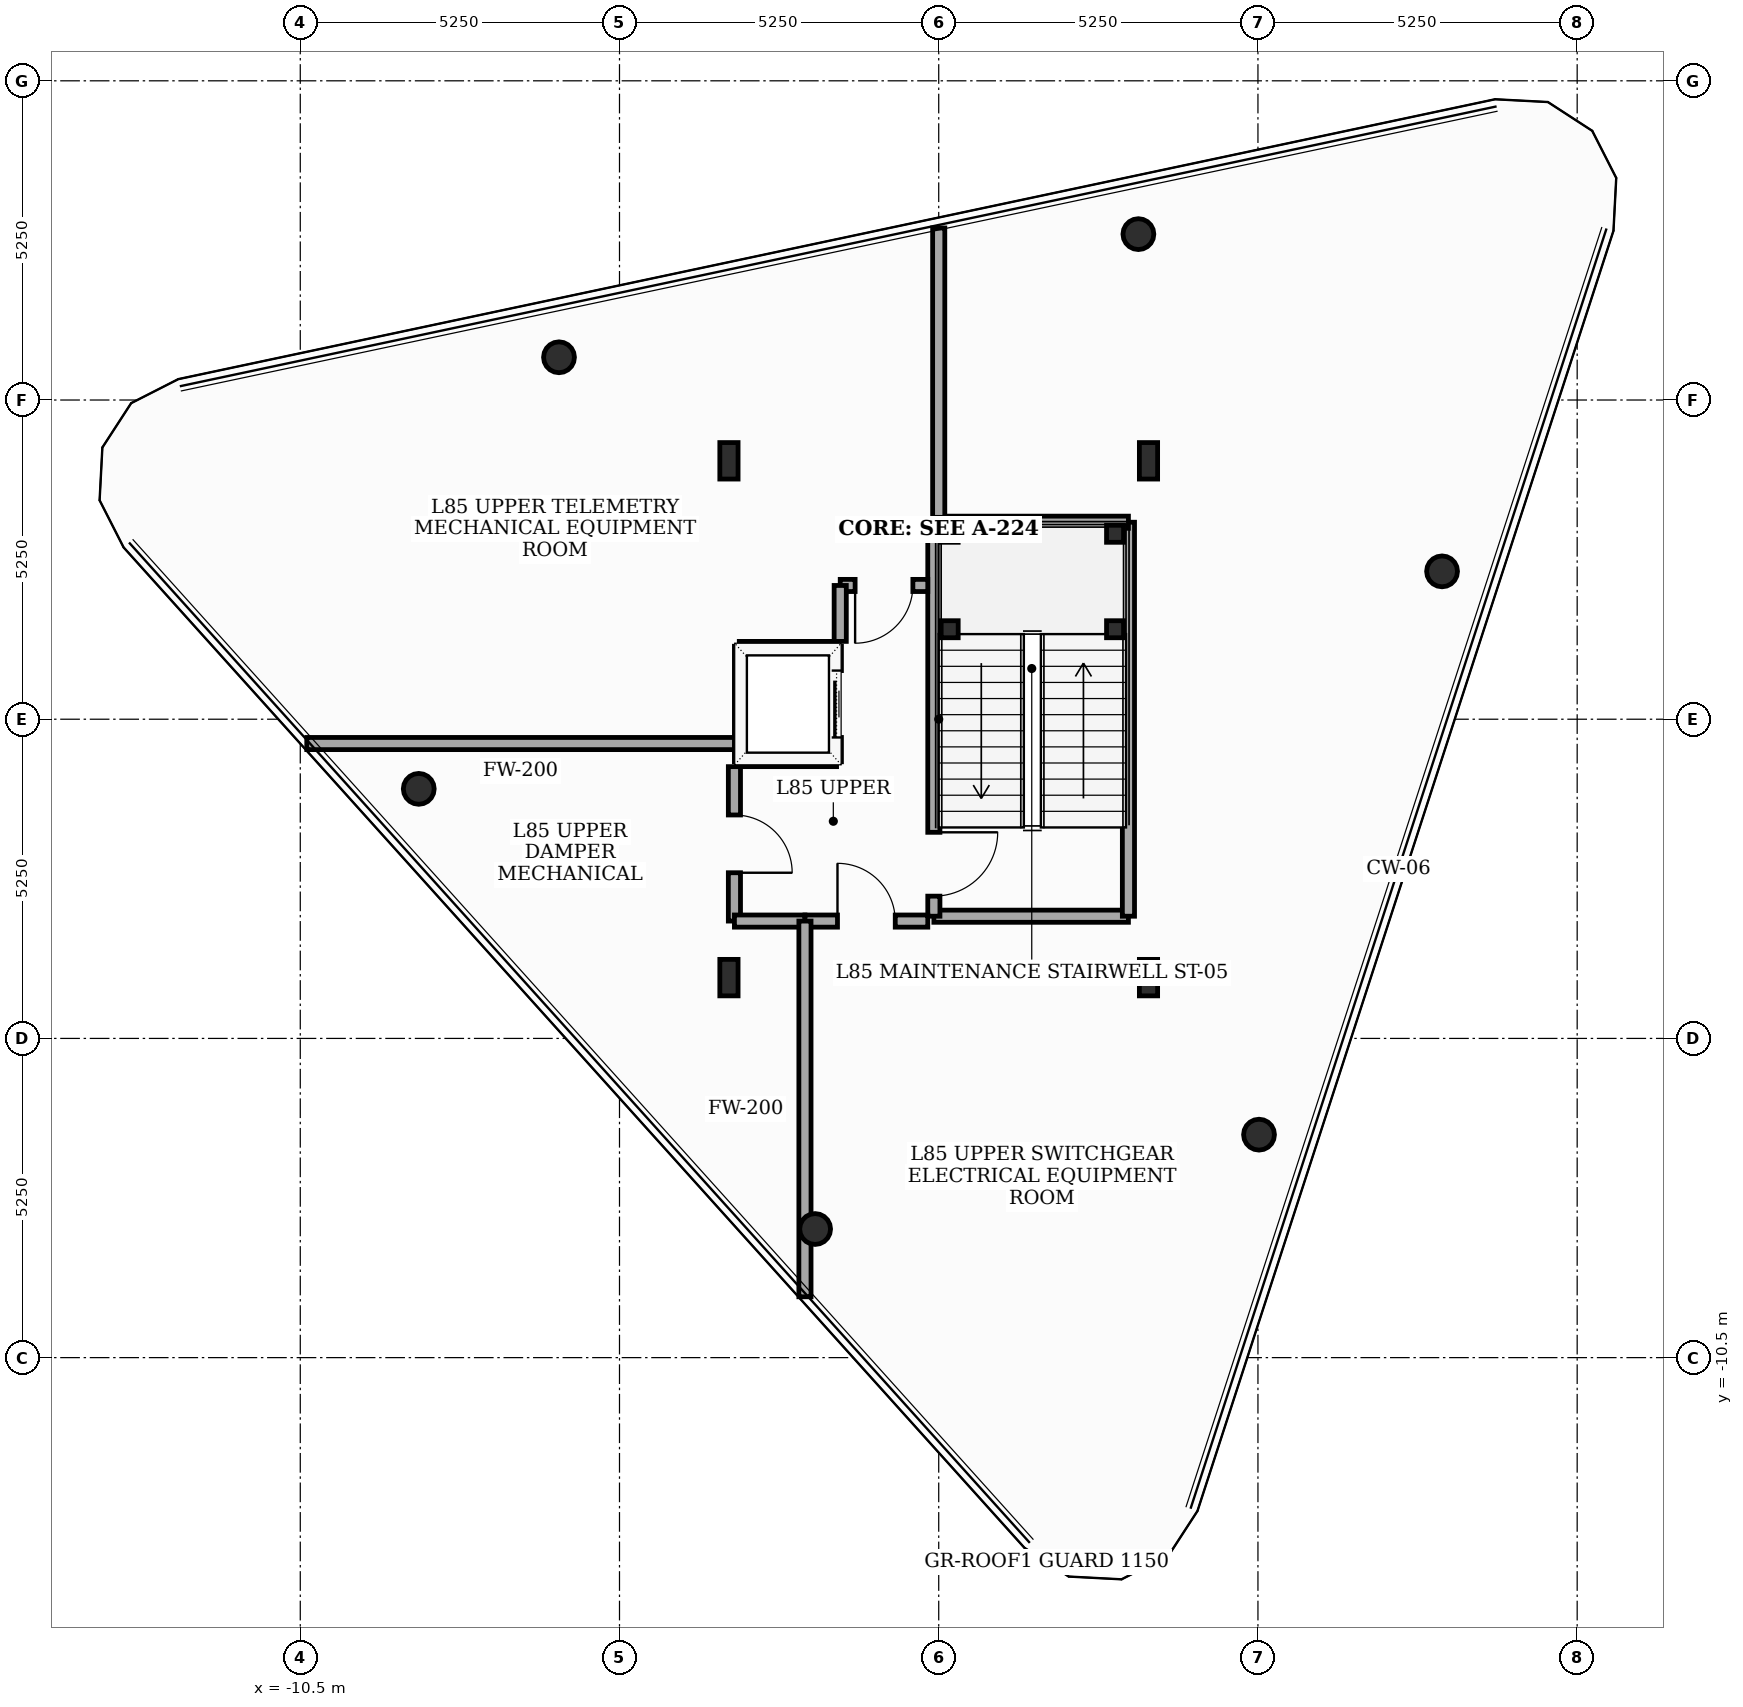
"""IFC4 building model, lengths in metres.
Left out: names, types, materials, properties, quantities, classifications, styles, units other than length and angle.
Written with IfcOpenShell. Run it as: python <this file> out.ifc"""

import sys

from ifc_helpers import new_model, si_unit, direction, frame, frame_2d, origin, origin_2d, place, context, subcontext, project, spatial, rectangle, hollow_circle, i_section, extrude, element, fill, save


model = new_model("IFC4")
c1 = context("Model", 3, precision=1e-05, world=origin(), true_north=direction((0.0, 1.0)))
c2 = subcontext(c1, "Body", "Model", "MODEL_VIEW")
j1 = project(units=[si_unit("LENGTHUNIT", "METRE"), si_unit("PLANEANGLEUNIT", "RADIAN")], contexts=[c1])
p1 = place(None, origin())
s1 = spatial("IfcSite", under=j1, at=p1, CompositionType="ELEMENT")
p2 = place(p1, origin())
s2 = spatial("IfcBuilding", under=s1, at=p2, CompositionType="ELEMENT")
p3 = place(p2, frame((0.0, 0.0, 330.8)))
s3 = spatial("IfcBuildingStorey", under=s2, at=p3, CompositionType="ELEMENT", Elevation=330.8)
for number, where, z_axis, x_axis in (
    (1, (-3.45, -4.25, 0.0), (0.0, 0.0, 1.0), (1.0, 0.0, 0.0)),
    (2, (3.45, -4.25, 0.0), (0.0, 0.0, 1.0), (1.0, 0.0, 0.0)),
    (3, (3.45, 4.25, 0.0), (0.0, 0.0, 1.0), (1.0, 0.0, 0.0)),
    (4, (-3.45, 4.25, 0.0), (0.0, 0.0, 1.0), (1.0, 0.0, 0.0)),
):
    element("IfcColumn", number, at=place(p3, frame(where, z_axis=z_axis, x_axis=x_axis)), inside=s3, PredefinedType="COLUMN", context=c2, shape_type="SweptSolid", body=[
        extrude(i_section(OverallWidth=0.3, OverallDepth=0.6, WebThickness=0.015, FlangeThickness=0.03, at=origin_2d()), origin(), (0.0, 0.0, 1.0), 4.2),
    ])
for number, where, z_axis, x_axis in (
    (5, (5.268, -6.833, 0.0), (0.0, 0.0, 1.0), (0.309, 0.951, 0.0)),
    (6, (8.278, 2.432, 0.0), (0.0, 0.0, 1.0), (0.309, 0.951, 0.0)),
    (7, (3.284, 7.978, 0.0), (0.0, 0.0, 1.0), (0.309, 0.951, 0.0)),
    (8, (-6.245, 5.953, 0.0), (0.0, 0.0, 1.0), (0.309, 0.951, 0.0)),
    (9, (-8.551, -1.145, 0.0), (0.0, 0.0, 1.0), (0.309, 0.951, 0.0)),
    (10, (-2.033, -8.385, 0.0), (0.0, 0.0, 1.0), (0.309, 0.951, 0.0)),
):
    element("IfcColumn", number, at=place(p3, frame(where, z_axis=z_axis, x_axis=x_axis)), inside=s3, PredefinedType="COLUMN", context=c2, shape_type="SweptSolid", body=[
        extrude(hollow_circle(Radius=0.254, WallThickness=0.025, at=origin_2d()), origin(), (0.0, 0.0, 1.0), 4.2),
    ])
for number, where, z_axis, x_axis in (
    (11, (0.18, 1.48, 0.0), (0.0, 0.0, 1.0), (1.0, 0.0, 0.0)),
    (12, (2.9, 1.48, 0.0), (0.0, 0.0, 1.0), (1.0, 0.0, 0.0)),
    (13, (0.18, 3.05, 0.0), (0.0, 0.0, 1.0), (1.0, 0.0, 0.0)),
    (14, (2.9, 3.05, 0.0), (0.0, 0.0, 1.0), (1.0, 0.0, 0.0)),
):
    element("IfcColumn", number, at=place(p3, frame(where, z_axis=z_axis, x_axis=x_axis)), inside=s3, PredefinedType="PILASTER", context=c2, shape_type="SweptSolid", body=[
        extrude(i_section(OverallWidth=0.28, OverallDepth=0.28, WebThickness=0.01, FlangeThickness=0.018, at=origin_2d()), origin(), (0.0, 0.0, 1.0), 4.2),
    ])
p4 = place(p3, frame((-0.08, -3.24, 0.0), z_axis=(0.0, 0.0, 1.0), x_axis=(1.0, 0.0, 0.0)))
e15 = element("IfcWall", 15, at=p4, inside=s3, PredefinedType="SOLIDWALL", context=c2, shape_type="SweptSolid", body=[
    extrude(rectangle(XDim=3.2, YDim=0.2, at=frame_2d((1.6, 0.0))), origin(), (0.0, 0.0, 1.0), 3.98),
])
p5 = place(p3, frame((3.12, -3.24, 0.0), z_axis=(0.0, 0.0, 1.0), x_axis=(0.0, 1.0, 0.0)))
e16 = element("IfcWall", 16, at=p5, inside=s3, PredefinedType="SOLIDWALL", context=c2, shape_type="SweptSolid", body=[
    extrude(rectangle(XDim=6.48, YDim=0.2, at=frame_2d((3.24, 0.0))), origin(), (0.0, 0.0, 1.0), 2.565),
])
p6 = place(p3, frame((3.12, 3.24, 0.0), z_axis=(0.0, 0.0, 1.0), x_axis=(-1.0, 0.0, 0.0)))
e17 = element("IfcWall", 17, at=p6, inside=s3, PredefinedType="SOLIDWALL", context=c2, shape_type="SweptSolid", body=[
    extrude(rectangle(XDim=3.2, YDim=0.2, at=frame_2d((1.6, 0.0))), origin(), (0.0, 0.0, 1.0), 3.98),
])
p7 = place(p3, frame((-0.08, 3.24, 0.0), z_axis=(0.0, 0.0, 1.0), x_axis=(0.0, -1.0, 0.0)))
e18 = element("IfcWall", 18, at=p7, inside=s3, PredefinedType="SOLIDWALL", context=c2, shape_type="SweptSolid", body=[
    extrude(rectangle(XDim=6.48, YDim=0.2, at=frame_2d((3.24, 0.0))), origin(), (0.0, 0.0, 1.0), 3.98),
])
p8 = place(p7, frame((5.1, 0.0, 0.0)))
e19 = element("IfcOpeningElement", 19, at=p8, cuts=e18, PredefinedType="OPENING", context=c2, shape_type="SweptSolid", body=[
    extrude(rectangle(XDim=1.05, YDim=2.15, at=frame_2d((0.525, 1.075))), frame((0.0, 0.11, 0.0), z_axis=(0.0, -1.0, 0.0), x_axis=(1.0, 0.0, 0.0)), (0.0, 0.0, 1.0), 0.22),
])
p9 = place(p3, frame((-3.28, -0.7, 0.0), z_axis=(0.0, 0.0, 1.0), x_axis=(0.0, 1.0, 0.0)))
e20 = element("IfcWall", 20, at=p9, inside=s3, PredefinedType="SOLIDWALL", context=c2, shape_type="SweptSolid", body=[
    extrude(rectangle(XDim=1.9, YDim=0.16, at=frame_2d((0.95, 0.0))), origin(), (0.0, 0.0, 1.0), 2.565),
])
for number, where, z_axis, x_axis in (
    (21, (-3.28, 1.2, 0.0), (0.0, 0.0, 1.0), (1.0, 0.0, 0.0)),
    (22, (-1.68, -0.7, 0.0), (0.0, 0.0, 1.0), (-1.0, 0.0, 0.0)),
):
    element("IfcWall", number, at=place(p3, frame(where, z_axis=z_axis, x_axis=x_axis)), inside=s3, PredefinedType="SOLIDWALL", context=c2, shape_type="SweptSolid", body=[
        extrude(rectangle(XDim=1.6, YDim=0.16, at=frame_2d((0.8, 0.0))), origin(), (0.0, 0.0, 1.0), 2.565),
    ])
p10 = place(p3, frame((-1.68, -0.7, 0.0), z_axis=(0.0, 0.0, 1.0), x_axis=(0.0, 1.0, 0.0)))
e23 = element("IfcWall", 23, at=p10, inside=s3, PredefinedType="SOLIDWALL", context=c2, shape_type="SweptSolid", body=[
    extrude(rectangle(XDim=1.9, YDim=0.16, at=frame_2d((0.95, 0.0))), origin(), (0.0, 0.0, 1.0), 3.98),
])
p11 = place(p10, frame((0.4, 0.0, 0.0)))
e24 = element("IfcOpeningElement", 24, at=p11, cuts=e23, PredefinedType="OPENING", context=c2, shape_type="SweptSolid", body=[
    extrude(rectangle(XDim=1.1, YDim=2.1, at=frame_2d((0.55, 1.05))), frame((0.0, 0.09, 0.0), z_axis=(0.0, -1.0, 0.0), x_axis=(1.0, 0.0, 0.0)), (0.0, 0.0, 1.0), 0.18),
])
p12 = place(p3, frame((-3.36, -0.78, 0.0), z_axis=(0.0, 0.0, 1.0), x_axis=(0.0, -1.0, 0.0)))
e25 = element("IfcWall", 25, at=p12, inside=s3, PredefinedType="SOLIDWALL", context=c2, shape_type="SweptSolid", body=[
    extrude(rectangle(XDim=2.54, YDim=0.2, at=frame_2d((1.27, 0.0))), origin(), (0.0, 0.0, 1.0), 2.565),
])
p13 = place(p12, frame((0.795, 0.0, 0.0)))
e26 = element("IfcOpeningElement", 26, at=p13, cuts=e25, PredefinedType="OPENING", context=c2, shape_type="SweptSolid", body=[
    extrude(rectangle(XDim=0.95, YDim=2.1, at=frame_2d((0.475, 1.05))), frame((0.0, 0.11, 0.0), z_axis=(0.0, -1.0, 0.0), x_axis=(1.0, 0.0, 0.0)), (0.0, 0.0, 1.0), 0.22),
])
p14 = place(p3, frame((-3.36, -3.32, 0.0), z_axis=(0.0, 0.0, 1.0), x_axis=(1.0, 0.0, 0.0)))
e27 = element("IfcWall", 27, at=p14, inside=s3, PredefinedType="SOLIDWALL", context=c2, shape_type="SweptSolid", body=[
    extrude(rectangle(XDim=1.16, YDim=0.2, at=frame_2d((0.58, 0.0))), origin(), (0.0, 0.0, 1.0), 2.565),
])
p15 = place(p3, frame((-2.2, -3.32, 0.0), z_axis=(0.0, 0.0, 1.0), x_axis=(1.0, 0.0, 0.0)))
e28 = element("IfcWall", 28, at=p15, inside=s3, PredefinedType="SOLIDWALL", context=c2, shape_type="SweptSolid", body=[
    extrude(rectangle(XDim=2.02, YDim=0.2, at=frame_2d((1.01, 0.0))), origin(), (0.0, 0.0, 1.0), 3.98),
])
p16 = place(p15, frame((0.535, 0.0, 0.0)))
e29 = element("IfcOpeningElement", 29, at=p16, cuts=e28, PredefinedType="OPENING", context=c2, shape_type="SweptSolid", body=[
    extrude(rectangle(XDim=0.95, YDim=2.1, at=frame_2d((0.475, 1.05))), frame((0.0, 0.11, 0.0), z_axis=(0.0, -1.0, 0.0), x_axis=(1.0, 0.0, 0.0)), (0.0, 0.0, 1.0), 0.22),
])
p17 = place(p3, frame((-0.18, 2.2, 0.0), z_axis=(0.0, 0.0, 1.0), x_axis=(-1.0, 0.0, 0.0)))
e30 = element("IfcWall", 30, at=p17, inside=s3, PredefinedType="SOLIDWALL", context=c2, shape_type="SweptSolid", body=[
    extrude(rectangle(XDim=1.44, YDim=0.2, at=frame_2d((0.72, 0.0))), origin(), (0.0, 0.0, 1.0), 3.98),
])
p18 = place(p17, frame((0.245, 0.0, 0.0)))
e31 = element("IfcOpeningElement", 31, at=p18, cuts=e30, PredefinedType="OPENING", context=c2, shape_type="SweptSolid", body=[
    extrude(rectangle(XDim=0.95, YDim=2.1, at=frame_2d((0.475, 1.05))), frame((0.0, 0.11, 0.0), z_axis=(0.0, -1.0, 0.0), x_axis=(1.0, 0.0, 0.0)), (0.0, 0.0, 1.0), 0.22),
])
p19 = place(p3, frame((-1.62, 2.2, 0.0), z_axis=(0.0, 0.0, 1.0), x_axis=(0.0, -1.0, 0.0)))
e32 = element("IfcWall", 32, at=p19, inside=s3, PredefinedType="SOLIDWALL", context=c2, shape_type="SweptSolid", body=[
    extrude(rectangle(XDim=0.92, YDim=0.2, at=frame_2d((0.46, 0.0))), origin(), (0.0, 0.0, 1.0), 3.98),
])
p20 = place(p3, frame((-2.2, -9.5, 0.0), z_axis=(0.0, 0.0, 1.0), x_axis=(0.0, 1.0, 0.0)))
e33 = element("IfcWall", 33, at=p20, inside=s3, PredefinedType="SOLIDWALL", context=c2, shape_type="SweptSolid", body=[
    extrude(rectangle(XDim=6.179, YDim=0.2, at=frame_2d((3.09, 0.0))), origin(), (0.0, 0.0, 1.0), 2.565),
])
p21 = place(p3, frame((-3.36, -0.4, 0.0), z_axis=(0.0, 0.0, 1.0), x_axis=(-1.0, 0.0, 0.0)))
e34 = element("IfcWall", 34, at=p21, inside=s3, PredefinedType="SOLIDWALL", context=c2, shape_type="SweptSolid", body=[
    extrude(rectangle(XDim=7.033, YDim=0.2, at=frame_2d((3.517, 0.0))), origin(), (0.0, 0.0, 1.0), 2.565),
])
p22 = place(p3, frame((0.0, 8.08, 0.0), z_axis=(0.0, 0.0, 1.0), x_axis=(0.0, -1.0, 0.0)))
e35 = element("IfcWall", 35, at=p22, inside=s3, PredefinedType="SOLIDWALL", context=c2, shape_type="SweptSolid", body=[
    extrude(rectangle(XDim=4.76, YDim=0.2, at=frame_2d((2.38, 0.0))), origin(), (0.0, 0.0, 1.0), 2.565),
])
p23 = place(p8, origin())
e36 = element("IfcDoor", 36, at=p23, inside=s3, OperationType="SINGLE_SWING_LEFT", PredefinedType="DOOR", context=c2, shape_type="SweptSolid", body=[
    extrude(rectangle(XDim=1.05, YDim=2.15, at=frame_2d((0.525, 1.075))), frame((0.0, 0.025, 0.0), z_axis=(0.0, -1.0, 0.0), x_axis=(1.0, 0.0, 0.0)), (0.0, 0.0, 1.0), 0.05),
])
fill(e19, e36)
p24 = place(p11, origin())
e37 = element("IfcDoor", 37, at=p24, inside=s3, OperationType="SLIDING_TO_LEFT", PredefinedType="DOOR", context=c2, shape_type="SweptSolid", body=[
    extrude(rectangle(XDim=1.1, YDim=2.1, at=frame_2d((0.55, 1.05))), frame((0.0, 0.025, 0.0), z_axis=(0.0, -1.0, 0.0), x_axis=(1.0, 0.0, 0.0)), (0.0, 0.0, 1.0), 0.05),
])
fill(e24, e37)
p25 = place(p13, origin())
e38 = element("IfcDoor", 38, at=p25, inside=s3, OperationType="SINGLE_SWING_RIGHT", PredefinedType="DOOR", context=c2, shape_type="SweptSolid", body=[
    extrude(rectangle(XDim=0.95, YDim=2.1, at=frame_2d((0.475, 1.05))), frame((0.0, 0.025, 0.0), z_axis=(0.0, -1.0, 0.0), x_axis=(1.0, 0.0, 0.0)), (0.0, 0.0, 1.0), 0.05),
])
fill(e26, e38)
p26 = place(p16, origin())
e39 = element("IfcDoor", 39, at=p26, inside=s3, OperationType="SINGLE_SWING_LEFT", PredefinedType="DOOR", context=c2, shape_type="SweptSolid", body=[
    extrude(rectangle(XDim=0.95, YDim=2.1, at=frame_2d((0.475, 1.05))), frame((0.0, 0.025, 0.0), z_axis=(0.0, -1.0, 0.0), x_axis=(1.0, 0.0, 0.0)), (0.0, 0.0, 1.0), 0.05),
])
fill(e29, e39)
p27 = place(p18, origin())
e40 = element("IfcDoor", 40, at=p27, inside=s3, OperationType="SINGLE_SWING_RIGHT", PredefinedType="DOOR", context=c2, shape_type="SweptSolid", body=[
    extrude(rectangle(XDim=0.95, YDim=2.1, at=frame_2d((0.475, 1.05))), frame((0.0, 0.025, 0.0), z_axis=(0.0, -1.0, 0.0), x_axis=(1.0, 0.0, 0.0)), (0.0, 0.0, 1.0), 0.05),
])
fill(e31, e40)
save(model, sys.argv[1])
